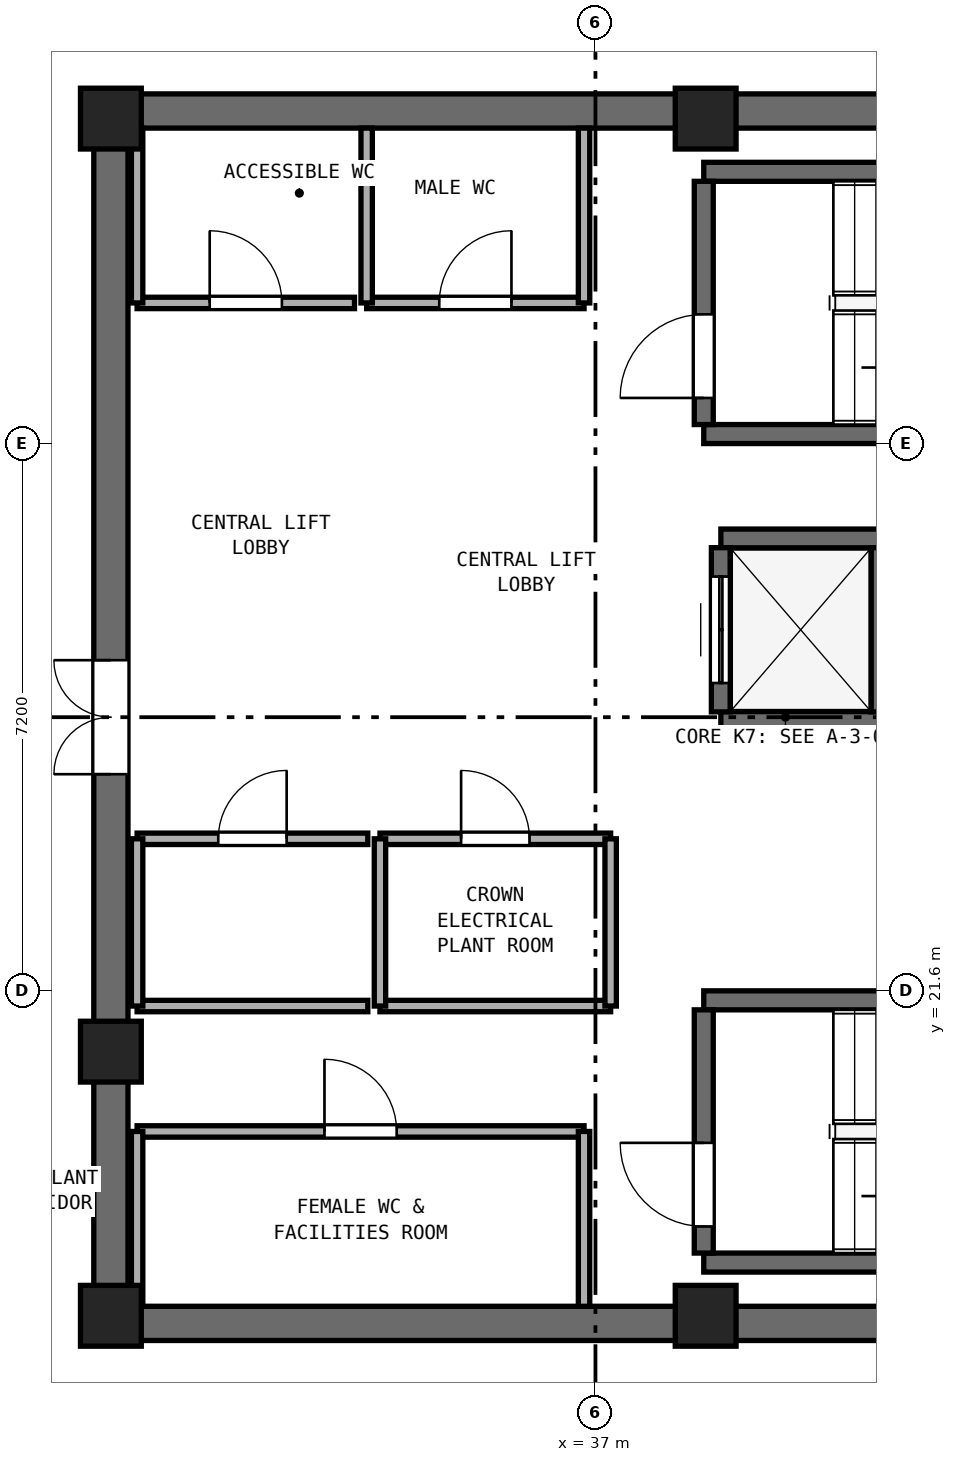
"""IFC4 building model, lengths in metres.
Left out: names, types, materials, properties, quantities, classifications, styles, units other than length and angle.
Written with IfcOpenShell. Run it as: python <this file> out.ifc"""

import sys

from ifc_helpers import new_model, si_unit, direction, frame, frame_2d, origin, origin_2d, place, context, subcontext, project, spatial, rectangle, extrude, element, fill, save


model = new_model("IFC4")
c1 = context("Model", 3, precision=1e-05, world=origin(), true_north=direction((0.0, 1.0)))
c2 = subcontext(c1, "Body", "Model", "MODEL_VIEW")
j1 = project(units=[si_unit("LENGTHUNIT", "METRE"), si_unit("PLANEANGLEUNIT", "RADIAN")], contexts=[c1])
p1 = place(None, origin())
s1 = spatial("IfcSite", under=j1, at=p1, CompositionType="ELEMENT")
p2 = place(p1, origin())
s2 = spatial("IfcBuilding", under=s1, at=p2, CompositionType="ELEMENT")
p3 = place(p2, frame((0.0, 0.0, 325.4)))
s3 = spatial("IfcBuildingStorey", under=s2, at=p3, CompositionType="ELEMENT", Elevation=325.4)
for number, where, z_axis, x_axis in (
    (1, (30.4, 17.225, 0.0), (0.0, 0.0, 1.0), (1.0, 0.0, 0.0)),
    (2, (30.4, 33.175, 0.0), (0.0, 0.0, 1.0), (1.0, 0.0, 0.0)),
):
    element("IfcWall", number, at=place(p3, frame(where, z_axis=z_axis, x_axis=x_axis)), inside=s3, PredefinedType="SHEAR", context=c2, shape_type="SweptSolid", body=[
        extrude(rectangle(XDim=18.2, YDim=0.45, at=frame_2d((9.1, 0.0))), origin(), (0.0, 0.0, 1.0), 3.72),
    ])
p4 = place(p3, frame((30.625, 17.45, 0.0), z_axis=(0.0, 0.0, 1.0), x_axis=(0.0, 1.0, 0.0)))
e3 = element("IfcWall", 3, at=p4, inside=s3, PredefinedType="SHEAR", context=c2, shape_type="SweptSolid", body=[
    extrude(rectangle(XDim=15.5, YDim=0.45, at=frame_2d((7.75, 0.0))), origin(), (0.0, 0.0, 1.0), 3.72),
])
p5 = place(p4, frame((7.0, 0.0, 0.0)))
e4 = element("IfcOpeningElement", 4, at=p5, cuts=e3, PredefinedType="OPENING", context=c2, shape_type="SweptSolid", body=[
    extrude(rectangle(XDim=1.5, YDim=2.15, at=frame_2d((0.75, 1.075))), frame((0.0, 0.235, 0.0), z_axis=(0.0, -1.0, 0.0), x_axis=(1.0, 0.0, 0.0)), (0.0, 0.0, 1.0), 0.47),
])
for number, where, z_axis, x_axis in (
    (5, (30.625, 17.325, 0.0), (0.0, 0.0, 1.0), (1.0, 0.0, 0.0)),
    (6, (38.45, 17.325, 0.0), (0.0, 0.0, 1.0), (1.0, 0.0, 0.0)),
    (7, (38.45, 33.075, 0.0), (0.0, 0.0, 1.0), (1.0, 0.0, 0.0)),
    (8, (30.625, 33.075, 0.0), (0.0, 0.0, 1.0), (1.0, 0.0, 0.0)),
    (9, (30.625, 20.8, 0.0), (0.0, 0.0, 1.0), (1.0, 0.0, 0.0)),
):
    element("IfcColumn", number, at=place(p3, frame(where, z_axis=z_axis, x_axis=x_axis)), inside=s3, PredefinedType="PILASTER", context=c2, shape_type="SweptSolid", body=[
        extrude(rectangle(XDim=0.8, YDim=0.8, at=origin_2d()), origin(), (0.0, 0.0, 1.0), 4.0),
    ])
for number, where, z_axis, x_axis in (
    (10, (38.425, 28.925, 0.0), (0.0, 0.0, 1.0), (1.0, 0.0, 0.0)),
    (11, (38.425, 32.375, 0.0), (0.0, 0.0, 1.0), (1.0, 0.0, 0.0)),
):
    element("IfcWall", number, at=place(p3, frame(where, z_axis=z_axis, x_axis=x_axis)), inside=s3, PredefinedType="SHEAR", context=c2, shape_type="SweptSolid", body=[
        extrude(rectangle(XDim=7.3, YDim=0.25, at=frame_2d((3.65, 0.0))), origin(), (0.0, 0.0, 1.0), 3.72),
    ])
p6 = place(p3, frame((38.425, 29.05, 0.0), z_axis=(0.0, 0.0, 1.0), x_axis=(0.0, 1.0, 0.0)))
e12 = element("IfcWall", 12, at=p6, inside=s3, PredefinedType="SHEAR", context=c2, shape_type="SweptSolid", body=[
    extrude(rectangle(XDim=3.2, YDim=0.25, at=frame_2d((1.6, 0.0))), origin(), (0.0, 0.0, 1.0), 3.72),
])
p7 = place(p6, frame((0.35, 0.0, 0.0)))
e13 = element("IfcOpeningElement", 13, at=p7, cuts=e12, PredefinedType="OPENING", context=c2, shape_type="SweptSolid", body=[
    extrude(rectangle(XDim=1.1, YDim=2.15, at=frame_2d((0.55, 1.075))), frame((0.0, 0.135, 0.0), z_axis=(0.0, -1.0, 0.0), x_axis=(1.0, 0.0, 0.0)), (0.0, 0.0, 1.0), 0.27),
])
for number, where, z_axis, x_axis in (
    (14, (38.425, 18.025, 0.0), (0.0, 0.0, 1.0), (1.0, 0.0, 0.0)),
    (15, (38.425, 21.475, 0.0), (0.0, 0.0, 1.0), (1.0, 0.0, 0.0)),
):
    element("IfcWall", number, at=place(p3, frame(where, z_axis=z_axis, x_axis=x_axis)), inside=s3, PredefinedType="SHEAR", context=c2, shape_type="SweptSolid", body=[
        extrude(rectangle(XDim=7.3, YDim=0.25, at=frame_2d((3.65, 0.0))), origin(), (0.0, 0.0, 1.0), 3.72),
    ])
p8 = place(p3, frame((38.425, 18.15, 0.0), z_axis=(0.0, 0.0, 1.0), x_axis=(0.0, 1.0, 0.0)))
e16 = element("IfcWall", 16, at=p8, inside=s3, PredefinedType="SHEAR", context=c2, shape_type="SweptSolid", body=[
    extrude(rectangle(XDim=3.2, YDim=0.25, at=frame_2d((1.6, 0.0))), origin(), (0.0, 0.0, 1.0), 3.72),
])
p9 = place(p8, frame((0.35, 0.0, 0.0)))
e17 = element("IfcOpeningElement", 17, at=p9, cuts=e16, PredefinedType="OPENING", context=c2, shape_type="SweptSolid", body=[
    extrude(rectangle(XDim=1.1, YDim=2.15, at=frame_2d((0.55, 1.075))), frame((0.0, 0.135, 0.0), z_axis=(0.0, -1.0, 0.0), x_axis=(1.0, 0.0, 0.0)), (0.0, 0.0, 1.0), 0.27),
])
for number, where, z_axis, x_axis in (
    (18, (38.65, 25.15, 0.0), (0.0, 0.0, 1.0), (1.0, 0.0, 0.0)),
    (19, (38.65, 27.55, 0.0), (0.0, 0.0, 1.0), (1.0, 0.0, 0.0)),
):
    element("IfcWall", number, at=place(p3, frame(where, z_axis=z_axis, x_axis=x_axis)), inside=s3, PredefinedType="SHEAR", context=c2, shape_type="SweptSolid", body=[
        extrude(rectangle(XDim=2.1, YDim=0.25, at=frame_2d((1.05, 0.0))), origin(), (0.0, 0.0, 1.0), 3.72),
    ])
p10 = place(p3, frame((38.65, 25.27, 0.0), z_axis=(0.0, 0.0, 1.0), x_axis=(0.0, 1.0, 0.0)))
e20 = element("IfcWall", 20, at=p10, inside=s3, PredefinedType="SHEAR", context=c2, shape_type="SweptSolid", body=[
    extrude(rectangle(XDim=2.16, YDim=0.25, at=frame_2d((1.08, 0.0))), origin(), (0.0, 0.0, 1.0), 3.72),
])
p11 = place(p10, frame((0.38, 0.0, 0.0)))
e21 = element("IfcOpeningElement", 21, at=p11, cuts=e20, PredefinedType="OPENING", context=c2, shape_type="SweptSolid", body=[
    extrude(rectangle(XDim=1.4, YDim=2.2, at=frame_2d((0.7, 1.1))), frame((0.0, 0.135, 0.0), z_axis=(0.0, -1.0, 0.0), x_axis=(1.0, 0.0, 0.0)), (0.0, 0.0, 1.0), 0.27),
])
p12 = place(p3, frame((40.75, 25.27, 0.0), z_axis=(0.0, 0.0, 1.0), x_axis=(0.0, 1.0, 0.0)))
e22 = element("IfcWall", 22, at=p12, inside=s3, PredefinedType="SHEAR", context=c2, shape_type="SweptSolid", body=[
    extrude(rectangle(XDim=2.16, YDim=0.25, at=frame_2d((1.08, 0.0))), origin(), (0.0, 0.0, 1.0), 3.72),
])
p13 = place(p3, frame((30.97, 30.65, 0.0), z_axis=(0.0, 0.0, 1.0), x_axis=(1.0, 0.0, 0.0)))
e23 = element("IfcWall", 23, at=p13, inside=s3, PredefinedType="PARTITIONING", context=c2, shape_type="SweptSolid", body=[
    extrude(rectangle(XDim=2.86, YDim=0.15, at=frame_2d((1.43, 0.0))), origin(), (0.0, 0.0, 1.0), 3.72),
])
p14 = place(p13, frame((0.955, 0.0, 0.0)))
e24 = element("IfcOpeningElement", 24, at=p14, cuts=e23, PredefinedType="OPENING", context=c2, shape_type="SweptSolid", body=[
    extrude(rectangle(XDim=0.95, YDim=2.1, at=frame_2d((0.475, 1.05))), frame((0.0, 0.085, 0.0), z_axis=(0.0, -1.0, 0.0), x_axis=(1.0, 0.0, 0.0)), (0.0, 0.0, 1.0), 0.17),
])
p15 = place(p3, frame((30.97, 30.65, 0.0), z_axis=(0.0, 0.0, 1.0), x_axis=(0.0, 1.0, 0.0)))
e25 = element("IfcWall", 25, at=p15, inside=s3, PredefinedType="PARTITIONING", context=c2, shape_type="SweptSolid", body=[
    extrude(rectangle(XDim=2.3, YDim=0.15, at=frame_2d((1.15, 0.0))), origin(), (0.0, 0.0, 1.0), 2.82),
])
p16 = place(p3, frame((33.99, 30.65, 0.0), z_axis=(0.0, 0.0, 1.0), x_axis=(1.0, 0.0, 0.0)))
e26 = element("IfcWall", 26, at=p16, inside=s3, PredefinedType="PARTITIONING", context=c2, shape_type="SweptSolid", body=[
    extrude(rectangle(XDim=2.86, YDim=0.15, at=frame_2d((1.43, 0.0))), origin(), (0.0, 0.0, 1.0), 3.72),
])
p17 = place(p16, frame((0.955, 0.0, 0.0)))
e27 = element("IfcOpeningElement", 27, at=p17, cuts=e26, PredefinedType="OPENING", context=c2, shape_type="SweptSolid", body=[
    extrude(rectangle(XDim=0.95, YDim=2.1, at=frame_2d((0.475, 1.05))), frame((0.0, 0.085, 0.0), z_axis=(0.0, -1.0, 0.0), x_axis=(1.0, 0.0, 0.0)), (0.0, 0.0, 1.0), 0.17),
])
for number, where, z_axis, x_axis in (
    (28, (33.99, 30.65, 0.0), (0.0, 0.0, 1.0), (0.0, 1.0, 0.0)),
    (29, (36.85, 30.65, 0.0), (0.0, 0.0, 1.0), (0.0, 1.0, 0.0)),
):
    element("IfcWall", number, at=place(p3, frame(where, z_axis=z_axis, x_axis=x_axis)), inside=s3, PredefinedType="PARTITIONING", context=c2, shape_type="SweptSolid", body=[
        extrude(rectangle(XDim=2.3, YDim=0.15, at=frame_2d((1.15, 0.0))), origin(), (0.0, 0.0, 1.0), 3.72),
    ])
p18 = place(p3, frame((30.97, 19.75, 0.0), z_axis=(0.0, 0.0, 1.0), x_axis=(1.0, 0.0, 0.0)))
e30 = element("IfcWall", 30, at=p18, inside=s3, PredefinedType="PARTITIONING", context=c2, shape_type="SweptSolid", body=[
    extrude(rectangle(XDim=5.88, YDim=0.15, at=frame_2d((2.94, 0.0))), origin(), (0.0, 0.0, 1.0), 3.72),
])
p19 = place(p18, frame((2.465, 0.0, 0.0)))
e31 = element("IfcOpeningElement", 31, at=p19, cuts=e30, PredefinedType="OPENING", context=c2, shape_type="SweptSolid", body=[
    extrude(rectangle(XDim=0.95, YDim=2.1, at=frame_2d((0.475, 1.05))), frame((0.0, 0.085, 0.0), z_axis=(0.0, -1.0, 0.0), x_axis=(1.0, 0.0, 0.0)), (0.0, 0.0, 1.0), 0.17),
])
p20 = place(p3, frame((30.97, 17.45, 0.0), z_axis=(0.0, 0.0, 1.0), x_axis=(0.0, 1.0, 0.0)))
e32 = element("IfcWall", 32, at=p20, inside=s3, PredefinedType="PARTITIONING", context=c2, shape_type="SweptSolid", body=[
    extrude(rectangle(XDim=2.3, YDim=0.15, at=frame_2d((1.15, 0.0))), origin(), (0.0, 0.0, 1.0), 2.82),
])
p21 = place(p3, frame((36.85, 17.45, 0.0), z_axis=(0.0, 0.0, 1.0), x_axis=(0.0, 1.0, 0.0)))
e33 = element("IfcWall", 33, at=p21, inside=s3, PredefinedType="PARTITIONING", context=c2, shape_type="SweptSolid", body=[
    extrude(rectangle(XDim=2.3, YDim=0.15, at=frame_2d((1.15, 0.0))), origin(), (0.0, 0.0, 1.0), 3.72),
])
p22 = place(p3, frame((30.97, 21.4, 0.0), z_axis=(0.0, 0.0, 1.0), x_axis=(1.0, 0.0, 0.0)))
e34 = element("IfcWall", 34, at=p22, inside=s3, PredefinedType="PARTITIONING", context=c2, shape_type="SweptSolid", body=[
    extrude(rectangle(XDim=3.035, YDim=0.15, at=frame_2d((1.518, 0.0))), origin(), (0.0, 0.0, 1.0), 3.72),
])
p23 = place(p3, frame((30.97, 23.6, 0.0), z_axis=(0.0, 0.0, 1.0), x_axis=(1.0, 0.0, 0.0)))
e35 = element("IfcWall", 35, at=p23, inside=s3, PredefinedType="PARTITIONING", context=c2, shape_type="SweptSolid", body=[
    extrude(rectangle(XDim=3.035, YDim=0.15, at=frame_2d((1.518, 0.0))), origin(), (0.0, 0.0, 1.0), 3.72),
])
p24 = place(p23, frame((1.067, 0.0, 0.0)))
e36 = element("IfcOpeningElement", 36, at=p24, cuts=e35, PredefinedType="OPENING", context=c2, shape_type="SweptSolid", body=[
    extrude(rectangle(XDim=0.9, YDim=2.1, at=frame_2d((0.45, 1.05))), frame((0.0, 0.085, 0.0), z_axis=(0.0, -1.0, 0.0), x_axis=(1.0, 0.0, 0.0)), (0.0, 0.0, 1.0), 0.17),
])
p25 = place(p3, frame((30.97, 21.4, 0.0), z_axis=(0.0, 0.0, 1.0), x_axis=(0.0, 1.0, 0.0)))
e37 = element("IfcWall", 37, at=p25, inside=s3, PredefinedType="PARTITIONING", context=c2, shape_type="SweptSolid", body=[
    extrude(rectangle(XDim=2.2, YDim=0.15, at=frame_2d((1.1, 0.0))), origin(), (0.0, 0.0, 1.0), 2.82),
])
p26 = place(p3, frame((34.165, 21.4, 0.0), z_axis=(0.0, 0.0, 1.0), x_axis=(1.0, 0.0, 0.0)))
e38 = element("IfcWall", 38, at=p26, inside=s3, PredefinedType="PARTITIONING", context=c2, shape_type="SweptSolid", body=[
    extrude(rectangle(XDim=3.035, YDim=0.15, at=frame_2d((1.518, 0.0))), origin(), (0.0, 0.0, 1.0), 3.72),
])
p27 = place(p3, frame((34.165, 23.6, 0.0), z_axis=(0.0, 0.0, 1.0), x_axis=(1.0, 0.0, 0.0)))
e39 = element("IfcWall", 39, at=p27, inside=s3, PredefinedType="PARTITIONING", context=c2, shape_type="SweptSolid", body=[
    extrude(rectangle(XDim=3.035, YDim=0.15, at=frame_2d((1.518, 0.0))), origin(), (0.0, 0.0, 1.0), 3.72),
])
p28 = place(p27, frame((1.067, 0.0, 0.0)))
e40 = element("IfcOpeningElement", 40, at=p28, cuts=e39, PredefinedType="OPENING", context=c2, shape_type="SweptSolid", body=[
    extrude(rectangle(XDim=0.9, YDim=2.1, at=frame_2d((0.45, 1.05))), frame((0.0, 0.085, 0.0), z_axis=(0.0, -1.0, 0.0), x_axis=(1.0, 0.0, 0.0)), (0.0, 0.0, 1.0), 0.17),
])
for number, where, z_axis, x_axis in (
    (41, (34.165, 21.4, 0.0), (0.0, 0.0, 1.0), (0.0, 1.0, 0.0)),
    (42, (37.2, 21.4, 0.0), (0.0, 0.0, 1.0), (0.0, 1.0, 0.0)),
):
    element("IfcWall", number, at=place(p3, frame(where, z_axis=z_axis, x_axis=x_axis)), inside=s3, PredefinedType="PARTITIONING", context=c2, shape_type="SweptSolid", body=[
        extrude(rectangle(XDim=2.2, YDim=0.15, at=frame_2d((1.1, 0.0))), origin(), (0.0, 0.0, 1.0), 3.72),
    ])
p29 = place(p3, frame((31.856, 40.999, 0.0), z_axis=(0.0, 0.0, 1.0), x_axis=(-0.756468872678, -0.654029697085, 0.0)))
e43 = element("IfcWall", 43, at=p29, inside=s3, PredefinedType="STANDARD", context=c2, shape_type="SweptSolid", body=[
    extrude(rectangle(XDim=11.18, YDim=0.28, at=frame_2d((5.59, 0.0))), origin(), (0.0, 0.0, 1.0), 3.72),
])
p30 = place(p29, frame((1.397, 0.0, 0.9)))
e44 = element("IfcOpeningElement", 44, at=p30, cuts=e43, PredefinedType="OPENING", context=c2, shape_type="SweptSolid", body=[
    extrude(rectangle(XDim=1.6, YDim=1.45, at=frame_2d((0.8, 0.725))), frame((0.0, 0.15, 0.0), z_axis=(0.0, -1.0, 0.0), x_axis=(1.0, 0.0, 0.0)), (0.0, 0.0, 1.0), 0.3),
])
p31 = place(p29, frame((4.79, 0.0, 0.9)))
e45 = element("IfcOpeningElement", 45, at=p31, cuts=e43, PredefinedType="OPENING", context=c2, shape_type="SweptSolid", body=[
    extrude(rectangle(XDim=1.6, YDim=1.45, at=frame_2d((0.8, 0.725))), frame((0.0, 0.15, 0.0), z_axis=(0.0, -1.0, 0.0), x_axis=(1.0, 0.0, 0.0)), (0.0, 0.0, 1.0), 0.3),
])
p32 = place(p7, origin())
e46 = element("IfcDoor", 46, at=p32, inside=s3, OperationType="SINGLE_SWING_LEFT", PredefinedType="DOOR", context=c2, shape_type="SweptSolid", body=[
    extrude(rectangle(XDim=1.1, YDim=2.15, at=frame_2d((0.55, 1.075))), frame((0.0, 0.025, 0.0), z_axis=(0.0, -1.0, 0.0), x_axis=(1.0, 0.0, 0.0)), (0.0, 0.0, 1.0), 0.05),
])
fill(e13, e46)
p33 = place(p9, origin())
e47 = element("IfcDoor", 47, at=p33, inside=s3, OperationType="SINGLE_SWING_RIGHT", PredefinedType="DOOR", context=c2, shape_type="SweptSolid", body=[
    extrude(rectangle(XDim=1.1, YDim=2.15, at=frame_2d((0.55, 1.075))), frame((0.0, 0.025, 0.0), z_axis=(0.0, -1.0, 0.0), x_axis=(1.0, 0.0, 0.0)), (0.0, 0.0, 1.0), 0.05),
])
fill(e17, e47)
p34 = place(p11, origin())
e48 = element("IfcDoor", 48, at=p34, inside=s3, OperationType="DOUBLE_DOOR_SLIDING", PredefinedType="DOOR", context=c2, shape_type="SweptSolid", body=[
    extrude(rectangle(XDim=1.4, YDim=2.2, at=frame_2d((0.7, 1.1))), frame((0.0, 0.025, 0.0), z_axis=(0.0, -1.0, 0.0), x_axis=(1.0, 0.0, 0.0)), (0.0, 0.0, 1.0), 0.05),
])
fill(e21, e48)
p35 = place(p5, origin())
e49 = element("IfcDoor", 49, at=p35, inside=s3, OperationType="DOUBLE_DOOR_SINGLE_SWING", PredefinedType="DOOR", context=c2, shape_type="SweptSolid", body=[
    extrude(rectangle(XDim=1.5, YDim=2.15, at=frame_2d((0.75, 1.075))), frame((0.0, 0.025, 0.0), z_axis=(0.0, -1.0, 0.0), x_axis=(1.0, 0.0, 0.0)), (0.0, 0.0, 1.0), 0.05),
])
fill(e4, e49)
p36 = place(p14, origin())
e50 = element("IfcDoor", 50, at=p36, inside=s3, OperationType="SINGLE_SWING_LEFT", PredefinedType="DOOR", context=c2, shape_type="SweptSolid", body=[
    extrude(rectangle(XDim=0.95, YDim=2.1, at=frame_2d((0.475, 1.05))), frame((0.0, 0.025, 0.0), z_axis=(0.0, -1.0, 0.0), x_axis=(1.0, 0.0, 0.0)), (0.0, 0.0, 1.0), 0.05),
])
fill(e24, e50)
p37 = place(p17, origin())
e51 = element("IfcDoor", 51, at=p37, inside=s3, OperationType="SINGLE_SWING_RIGHT", PredefinedType="DOOR", context=c2, shape_type="SweptSolid", body=[
    extrude(rectangle(XDim=0.95, YDim=2.1, at=frame_2d((0.475, 1.05))), frame((0.0, 0.025, 0.0), z_axis=(0.0, -1.0, 0.0), x_axis=(1.0, 0.0, 0.0)), (0.0, 0.0, 1.0), 0.05),
])
fill(e27, e51)
p38 = place(p19, origin())
e52 = element("IfcDoor", 52, at=p38, inside=s3, OperationType="SINGLE_SWING_LEFT", PredefinedType="DOOR", context=c2, shape_type="SweptSolid", body=[
    extrude(rectangle(XDim=0.95, YDim=2.1, at=frame_2d((0.475, 1.05))), frame((0.0, 0.025, 0.0), z_axis=(0.0, -1.0, 0.0), x_axis=(1.0, 0.0, 0.0)), (0.0, 0.0, 1.0), 0.05),
])
fill(e31, e52)
p39 = place(p24, origin())
e53 = element("IfcDoor", 53, at=p39, inside=s3, OperationType="SINGLE_SWING_RIGHT", PredefinedType="DOOR", context=c2, shape_type="SweptSolid", body=[
    extrude(rectangle(XDim=0.9, YDim=2.1, at=frame_2d((0.45, 1.05))), frame((0.0, 0.025, 0.0), z_axis=(0.0, -1.0, 0.0), x_axis=(1.0, 0.0, 0.0)), (0.0, 0.0, 1.0), 0.05),
])
fill(e36, e53)
p40 = place(p28, origin())
e54 = element("IfcDoor", 54, at=p40, inside=s3, OperationType="SINGLE_SWING_LEFT", PredefinedType="DOOR", context=c2, shape_type="SweptSolid", body=[
    extrude(rectangle(XDim=0.9, YDim=2.1, at=frame_2d((0.45, 1.05))), frame((0.0, 0.025, 0.0), z_axis=(0.0, -1.0, 0.0), x_axis=(1.0, 0.0, 0.0)), (0.0, 0.0, 1.0), 0.05),
])
fill(e40, e54)
save(model, sys.argv[1])
